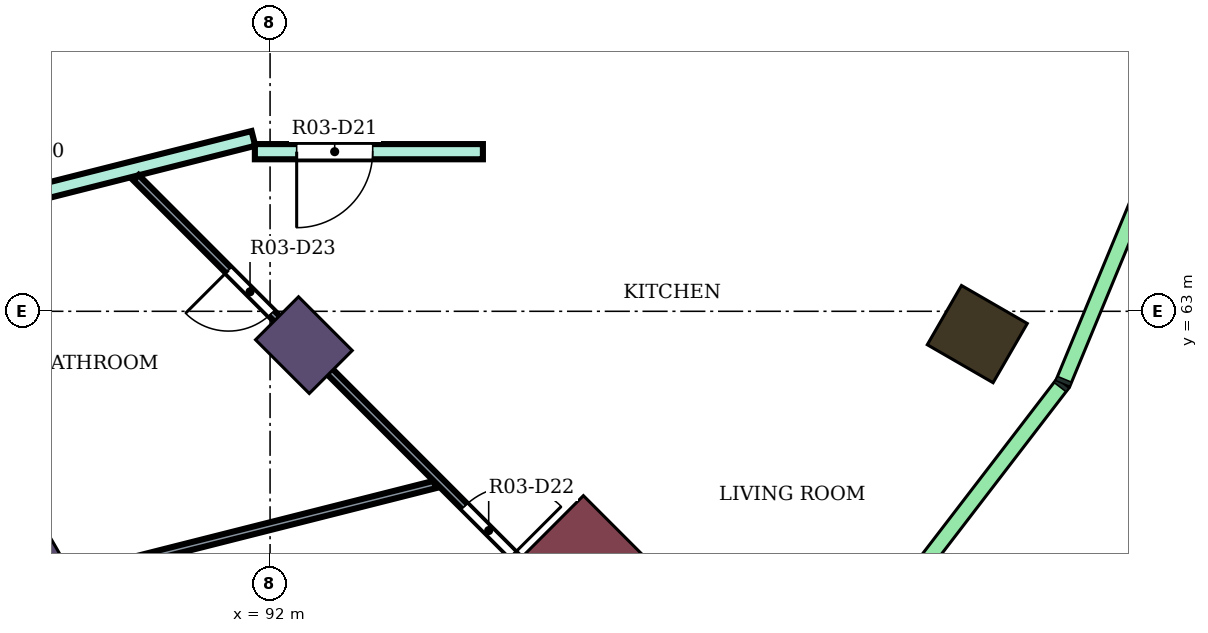
"""IFC4 building model, lengths in metres.
Left out: names, types, materials, properties, quantities, classifications, styles, units other than length and angle.
Written with IfcOpenShell. Run it as: python <this file> out.ifc"""

import sys

from ifc_helpers import new_model, si_unit, direction, frame, frame_2d, origin, origin_2d, place, context, subcontext, project, spatial, rectangle, extrude, element, fill, save


model = new_model("IFC4")
c1 = context("Model", 3, precision=1e-05, world=origin(), true_north=direction((0.0, 1.0)))
c2 = subcontext(c1, "Body", "Model", "MODEL_VIEW")
j1 = project(units=[si_unit("LENGTHUNIT", "METRE"), si_unit("PLANEANGLEUNIT", "RADIAN")], contexts=[c1])
p1 = place(None, origin())
s1 = spatial("IfcSite", under=j1, at=p1, CompositionType="ELEMENT")
p2 = place(p1, origin())
s2 = spatial("IfcBuilding", under=s1, at=p2, CompositionType="ELEMENT")
p3 = place(p2, frame((0.0, 0.0, 182.3)))
s3 = spatial("IfcBuildingStorey", under=s2, at=p3, CompositionType="ELEMENT", Elevation=182.3)
p4 = place(p3, frame((101.304, 62.7, 0.0), z_axis=(0.0, 0.0, 1.0), x_axis=(0.866025403784, -0.5, 0.0)))
e1 = element("IfcColumn", 1, at=p4, inside=s3, PredefinedType="COLUMN", context=c2, shape_type="SweptSolid", body=[
    extrude(rectangle(XDim=1.0, YDim=0.9, at=origin_2d()), origin(), (0.0, 0.0, 1.0), 4.1),
])
for number, where, z_axis, x_axis in (
    (2, (88.8, 59.758, 0.0), (0.0, 0.0, 1.0), (0.5, -0.866, 0.0)),
    (3, (92.445, 62.555, 0.0), (0.0, 0.0, 1.0), (0.707, -0.707, 0.0)),
):
    element("IfcColumn", number, at=place(p3, frame(where, z_axis=z_axis, x_axis=x_axis)), inside=s3, PredefinedType="COLUMN", context=c2, shape_type="SweptSolid", body=[
        extrude(rectangle(XDim=1.0, YDim=0.8, at=origin_2d()), origin(), (0.0, 0.0, 1.0), 4.1),
    ])
p5 = place(p3, frame((95.91, 59.09, 0.0), z_axis=(0.0, 0.0, 1.0), x_axis=(0.707106781187, -0.707106781187, 0.0)))
e4 = element("IfcColumn", 4, at=p5, inside=s3, PredefinedType="COLUMN", context=c2, shape_type="SweptSolid", body=[
    extrude(rectangle(XDim=1.8, YDim=2.4, at=origin_2d()), origin(), (0.0, 0.0, 1.0), 4.1),
])
p6 = place(p3, frame((86.053, 63.826, 0.0), z_axis=(0.0, 0.0, 1.0), x_axis=(0.969490004987, 0.245130843083, 0.0)))
e5 = element("IfcWall", 5, at=p6, inside=s3, PredefinedType="PARTITIONING", context=c2, shape_type="SweptSolid", body=[
    extrude(rectangle(XDim=5.908, YDim=0.2, at=frame_2d((2.954, 0.0))), origin(), (0.0, 0.0, 1.0), 3.65),
])
p7 = place(p3, frame((91.8, 65.1, 0.0), z_axis=(0.0, 0.0, 1.0), x_axis=(1.0, 0.0, 0.0)))
e6 = element("IfcWall", 6, at=p7, inside=s3, PredefinedType="PARTITIONING", context=c2, shape_type="SweptSolid", body=[
    extrude(rectangle(XDim=3.0, YDim=0.2, at=frame_2d((1.5, 0.0))), origin(), (0.0, 0.0, 1.0), 3.65),
])
p8 = place(p7, frame((0.55, 0.0, 0.0)))
e7 = element("IfcOpeningElement", 7, at=p8, cuts=e6, PredefinedType="OPENING", context=c2, shape_type="SweptSolid", body=[
    extrude(rectangle(XDim=1.0, YDim=2.1, at=frame_2d((0.5, 1.05))), frame((0.0, 0.11, 0.0), z_axis=(0.0, -1.0, 0.0), x_axis=(1.0, 0.0, 0.0)), (0.0, 0.0, 1.0), 0.22),
])
p9 = place(p3, frame((86.461, 63.81, 0.0), z_axis=(0.0, 0.0, 1.0), x_axis=(0.499911751641, -0.866076348004, 0.0)))
e8 = element("IfcWall", 8, at=p9, inside=s3, PredefinedType="PARTITIONING", context=c2, shape_type="SweptSolid", body=[
    extrude(rectangle(XDim=12.876, YDim=0.1, at=frame_2d((6.438, 0.0))), origin(), (0.0, 0.0, 1.0), 3.65),
])
p10 = place(p9, frame((9.514, 0.0, 0.0)))
e9 = element("IfcOpeningElement", 9, at=p10, cuts=e8, PredefinedType="OPENING", context=c2, shape_type="SweptSolid", body=[
    extrude(rectangle(XDim=0.9, YDim=2.1, at=frame_2d((0.45, 1.05))), frame((0.0, 0.06, 0.0), z_axis=(0.0, -1.0, 0.0), x_axis=(1.0, 0.0, 0.0)), (0.0, 0.0, 1.0), 0.12),
])
p11 = place(p3, frame((89.058, 59.429, 0.0), z_axis=(0.0, 0.0, 1.0), x_axis=(0.96946321375, 0.2452367778, 0.0)))
e10 = element("IfcWall", 10, at=p11, inside=s3, PredefinedType="PARTITIONING", context=c2, shape_type="SweptSolid", body=[
    extrude(rectangle(XDim=5.272, YDim=0.1, at=frame_2d((2.636, 0.0))), origin(), (0.0, 0.0, 1.0), 3.65),
])
p12 = place(p3, frame((90.236, 64.758, 0.0), z_axis=(0.0, 0.0, 1.0), x_axis=(0.706924769926, -0.707288745609, 0.0)))
e11 = element("IfcWall", 11, at=p12, inside=s3, PredefinedType="PARTITIONING", context=c2, shape_type="SweptSolid", body=[
    extrude(rectangle(XDim=8.72, YDim=0.1, at=frame_2d((4.36, 0.0))), origin(), (0.0, 0.0, 1.0), 3.65),
])
p13 = place(p12, frame((6.114, 0.0, 0.0)))
e12 = element("IfcOpeningElement", 12, at=p13, cuts=e11, PredefinedType="OPENING", context=c2, shape_type="SweptSolid", body=[
    extrude(rectangle(XDim=0.9, YDim=2.1, at=frame_2d((0.45, 1.05))), frame((0.0, 0.06, 0.0), z_axis=(0.0, -1.0, 0.0), x_axis=(1.0, 0.0, 0.0)), (0.0, 0.0, 1.0), 0.12),
])
p14 = place(p12, frame((1.722, 0.0, 0.0)))
e13 = element("IfcOpeningElement", 13, at=p14, cuts=e11, PredefinedType="OPENING", context=c2, shape_type="SweptSolid", body=[
    extrude(rectangle(XDim=0.8, YDim=2.1, at=frame_2d((0.4, 1.05))), frame((0.0, 0.06, 0.0), z_axis=(0.0, -1.0, 0.0), x_axis=(1.0, 0.0, 0.0)), (0.0, 0.0, 1.0), 0.12),
])
p15 = place(p8, frame((1.0, 0.0, 0.0), z_axis=(0.0, 0.0, 1.0), x_axis=(-1.0, 0.0, 0.0)))
e14 = element("IfcDoor", 14, at=p15, inside=s3, OperationType="SINGLE_SWING_RIGHT", PredefinedType="DOOR", context=c2, shape_type="SweptSolid", body=[
    extrude(rectangle(XDim=1.0, YDim=2.1, at=frame_2d((0.5, 1.05))), frame((0.0, 0.025, 0.0), z_axis=(0.0, -1.0, 0.0), x_axis=(1.0, 0.0, 0.0)), (0.0, 0.0, 1.0), 0.05),
])
fill(e7, e14)
p16 = place(p13, origin())
e15 = element("IfcDoor", 15, at=p16, inside=s3, OperationType="SINGLE_SWING_RIGHT", PredefinedType="DOOR", context=c2, shape_type="SweptSolid", body=[
    extrude(rectangle(XDim=0.9, YDim=2.1, at=frame_2d((0.45, 1.05))), frame((0.0, 0.025, 0.0), z_axis=(0.0, -1.0, 0.0), x_axis=(1.0, 0.0, 0.0)), (0.0, 0.0, 1.0), 0.05),
])
fill(e12, e15)
p17 = place(p14, frame((0.8, 0.0, 0.0), z_axis=(0.0, 0.0, 1.0), x_axis=(-1.0, 0.0, 0.0)))
e16 = element("IfcDoor", 16, at=p17, inside=s3, OperationType="SINGLE_SWING_RIGHT", PredefinedType="DOOR", context=c2, shape_type="SweptSolid", body=[
    extrude(rectangle(XDim=0.8, YDim=2.1, at=frame_2d((0.4, 1.05))), frame((0.0, 0.025, 0.0), z_axis=(0.0, -1.0, 0.0), x_axis=(1.0, 0.0, 0.0)), (0.0, 0.0, 1.0), 0.05),
])
fill(e13, e16)
save(model, sys.argv[1])
